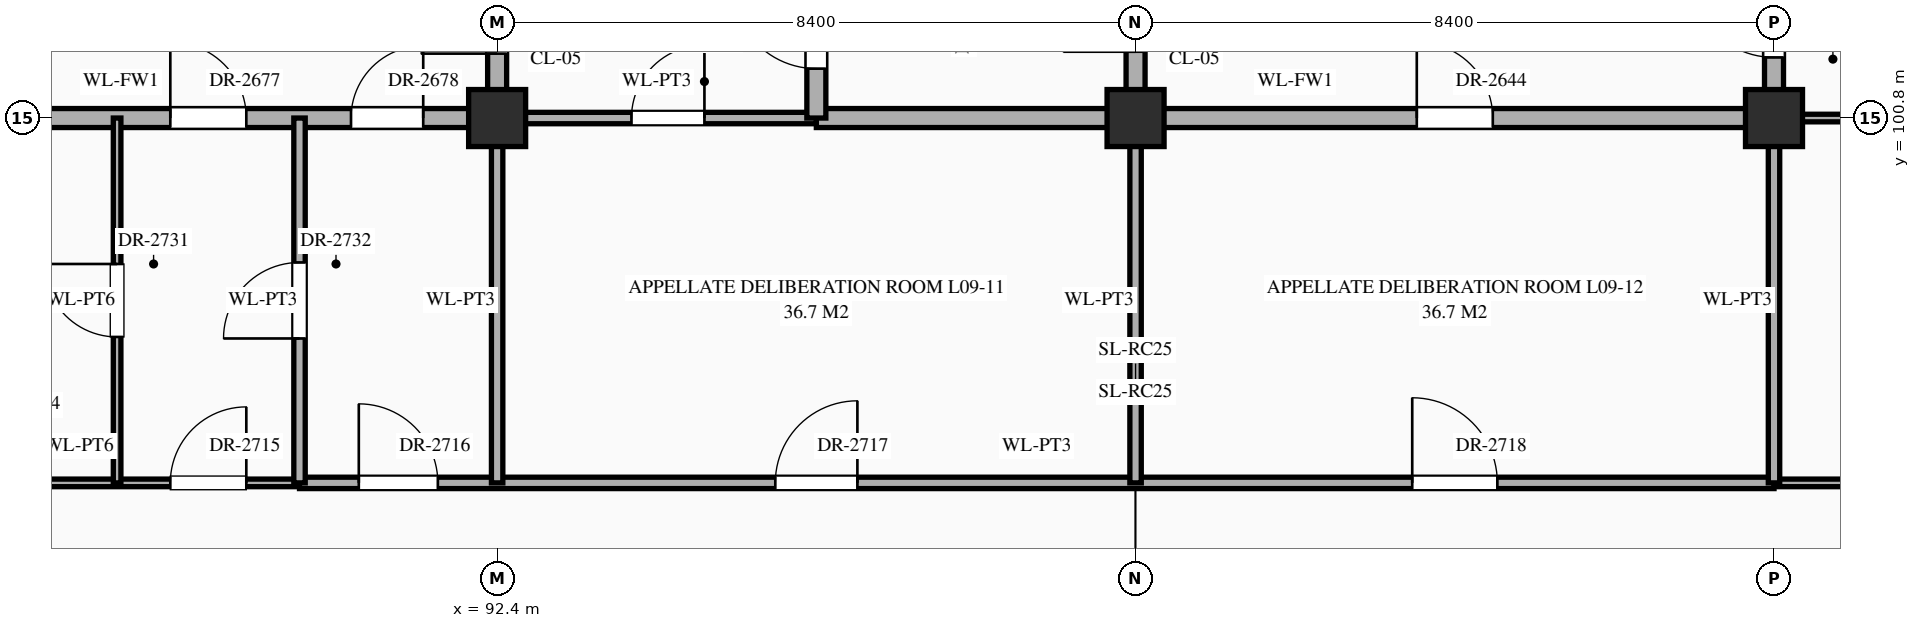
"""IFC4 building model, lengths in metres.
Left out: names, types, materials, properties, quantities, classifications, styles, units other than length and angle.
Written with IfcOpenShell. Run it as: python <this file> out.ifc"""

import sys

from ifc_helpers import new_model, si_unit, direction, frame, frame_2d, origin, origin_2d, place, context, subcontext, project, spatial, rectangle, extrude, element, fill, save


model = new_model("IFC4")
c1 = context("Model", 3, precision=1e-05, world=origin(), true_north=direction((0.0, 1.0)))
c2 = subcontext(c1, "Body", "Model", "MODEL_VIEW")
j1 = project(units=[si_unit("LENGTHUNIT", "METRE"), si_unit("PLANEANGLEUNIT", "RADIAN")], contexts=[c1])
p1 = place(None, origin())
s1 = spatial("IfcSite", under=j1, at=p1, CompositionType="ELEMENT")
p2 = place(p1, origin())
s2 = spatial("IfcBuilding", under=s1, at=p2, CompositionType="ELEMENT")
p3 = place(p2, frame((0.0, 0.0, 39.3)))
s3 = spatial("IfcBuildingStorey", under=s2, at=p3, CompositionType="ELEMENT", Elevation=39.3)
for number, where, z_axis, x_axis in (
    (1, (92.4, 100.8, 0.0), (0.0, 0.0, 1.0), (1.0, 0.0, 0.0)),
    (2, (100.8, 100.8, 0.0), (0.0, 0.0, 1.0), (1.0, 0.0, 0.0)),
    (3, (109.2, 100.8, 0.0), (0.0, 0.0, 1.0), (1.0, 0.0, 0.0)),
):
    element("IfcColumn", number, at=place(p3, frame(where, z_axis=z_axis, x_axis=x_axis)), inside=s3, PredefinedType="COLUMN", context=c2, shape_type="SweptSolid", body=[
        extrude(rectangle(XDim=0.75, YDim=0.75, at=origin_2d()), origin(), (0.0, 0.0, 1.0), 4.2),
    ])
p4 = place(p3, frame((84.0, 96.0, 0.0), z_axis=(0.0, 0.0, 1.0), x_axis=(1.0, 0.0, 0.0)))
e4 = element("IfcWall", 4, at=p4, inside=s3, PredefinedType="STANDARD", context=c2, shape_type="SweptSolid", body=[
    extrude(rectangle(XDim=5.8, YDim=0.1, at=frame_2d((2.9, 0.0))), origin(), (0.0, 0.0, 1.0), 3.95),
])
p5 = place(p4, frame((1.22, 0.0, 0.0)))
e5 = element("IfcOpeningElement", 5, at=p5, cuts=e4, PredefinedType="OPENING", context=c2, shape_type="SweptSolid", body=[
    extrude(rectangle(XDim=0.96, YDim=2.2, at=frame_2d((0.48, 1.1))), frame((0.0, 0.062, 0.0), z_axis=(0.0, -1.0, 0.0), x_axis=(1.0, 0.0, 0.0)), (0.0, 0.0, 1.0), 0.124),
])
p6 = place(p4, frame((4.1, 0.0, 0.0)))
e6 = element("IfcOpeningElement", 6, at=p6, cuts=e4, PredefinedType="OPENING", context=c2, shape_type="SweptSolid", body=[
    extrude(rectangle(XDim=1.0, YDim=2.25, at=frame_2d((0.5, 1.125))), frame((0.0, 0.062, 0.0), z_axis=(0.0, -1.0, 0.0), x_axis=(1.0, 0.0, 0.0)), (0.0, 0.0, 1.0), 0.124),
])
p7 = place(p3, frame((89.8, 96.0, 0.0), z_axis=(0.0, 0.0, 1.0), x_axis=(1.0, 0.0, 0.0)))
e7 = element("IfcWall", 7, at=p7, inside=s3, PredefinedType="STANDARD", context=c2, shape_type="SweptSolid", body=[
    extrude(rectangle(XDim=19.4, YDim=0.15, at=frame_2d((9.7, 0.0))), origin(), (0.0, 0.0, 1.0), 3.95),
])
p8 = place(p7, frame((0.78, 0.0, 0.0)))
e8 = element("IfcOpeningElement", 8, at=p8, cuts=e7, PredefinedType="OPENING", context=c2, shape_type="SweptSolid", body=[
    extrude(rectangle(XDim=1.04, YDim=2.2, at=frame_2d((0.52, 1.1))), frame((0.0, 0.087, 0.0), z_axis=(0.0, -1.0, 0.0), x_axis=(1.0, 0.0, 0.0)), (0.0, 0.0, 1.0), 0.174),
])
p9 = place(p7, frame((6.26, 0.0, 0.0)))
e9 = element("IfcOpeningElement", 9, at=p9, cuts=e7, PredefinedType="OPENING", context=c2, shape_type="SweptSolid", body=[
    extrude(rectangle(XDim=1.08, YDim=2.25, at=frame_2d((0.54, 1.125))), frame((0.0, 0.087, 0.0), z_axis=(0.0, -1.0, 0.0), x_axis=(1.0, 0.0, 0.0)), (0.0, 0.0, 1.0), 0.174),
])
p10 = place(p7, frame((14.64, 0.0, 0.0)))
e10 = element("IfcOpeningElement", 10, at=p10, cuts=e7, PredefinedType="OPENING", context=c2, shape_type="SweptSolid", body=[
    extrude(rectangle(XDim=1.12, YDim=2.25, at=frame_2d((0.56, 1.125))), frame((0.0, 0.087, 0.0), z_axis=(0.0, -1.0, 0.0), x_axis=(1.0, 0.0, 0.0)), (0.0, 0.0, 1.0), 0.174),
])
p11 = place(p3, frame((109.2, 96.0, 0.0), z_axis=(0.0, 0.0, 1.0), x_axis=(1.0, 0.0, 0.0)))
e11 = element("IfcWall", 11, at=p11, inside=s3, PredefinedType="STANDARD", context=c2, shape_type="SweptSolid", body=[
    extrude(rectangle(XDim=5.8, YDim=0.1, at=frame_2d((2.9, 0.0))), origin(), (0.0, 0.0, 1.0), 3.95),
])
p12 = place(p11, frame((1.12, 0.0, 0.0)))
e12 = element("IfcOpeningElement", 12, at=p12, cuts=e11, PredefinedType="OPENING", context=c2, shape_type="SweptSolid", body=[
    extrude(rectangle(XDim=1.16, YDim=2.3, at=frame_2d((0.58, 1.15))), frame((0.0, 0.062, 0.0), z_axis=(0.0, -1.0, 0.0), x_axis=(1.0, 0.0, 0.0)), (0.0, 0.0, 1.0), 0.124),
])
p13 = place(p11, frame((4.0, 0.0, 0.0)))
e13 = element("IfcOpeningElement", 13, at=p13, cuts=e11, PredefinedType="OPENING", context=c2, shape_type="SweptSolid", body=[
    extrude(rectangle(XDim=1.2, YDim=2.35, at=frame_2d((0.6, 1.175))), frame((0.0, 0.062, 0.0), z_axis=(0.0, -1.0, 0.0), x_axis=(1.0, 0.0, 0.0)), (0.0, 0.0, 1.0), 0.124),
])
p14 = place(p3, frame((75.6, 100.8, 0.0), z_axis=(0.0, 0.0, 1.0), x_axis=(1.0, 0.0, 0.0)))
e14 = element("IfcWall", 14, at=p14, inside=s3, PredefinedType="STANDARD", context=c2, shape_type="SweptSolid", body=[
    extrude(rectangle(XDim=16.8, YDim=0.25, at=frame_2d((8.4, 0.0))), origin(), (0.0, 0.0, 1.0), 3.1),
])
p15 = place(p14, frame((3.7, 0.0, 0.0)))
e15 = element("IfcOpeningElement", 15, at=p15, cuts=e14, PredefinedType="OPENING", context=c2, shape_type="SweptSolid", body=[
    extrude(rectangle(XDim=1.0, YDim=2.2, at=frame_2d((0.5, 1.1))), frame((0.0, 0.137, 0.0), z_axis=(0.0, -1.0, 0.0), x_axis=(1.0, 0.0, 0.0)), (0.0, 0.0, 1.0), 0.274),
])
p16 = place(p14, frame((9.698, 0.0, 0.0)))
e16 = element("IfcOpeningElement", 16, at=p16, cuts=e14, PredefinedType="OPENING", context=c2, shape_type="SweptSolid", body=[
    extrude(rectangle(XDim=1.1, YDim=2.2, at=frame_2d((0.55, 1.1))), frame((0.0, 0.137, 0.0), z_axis=(0.0, -1.0, 0.0), x_axis=(1.0, 0.0, 0.0)), (0.0, 0.0, 1.0), 0.274),
])
p17 = place(p14, frame((12.5, 0.0, 0.0)))
e17 = element("IfcOpeningElement", 17, at=p17, cuts=e14, PredefinedType="OPENING", context=c2, shape_type="SweptSolid", body=[
    extrude(rectangle(XDim=1.0, YDim=2.2, at=frame_2d((0.5, 1.1))), frame((0.0, 0.137, 0.0), z_axis=(0.0, -1.0, 0.0), x_axis=(1.0, 0.0, 0.0)), (0.0, 0.0, 1.0), 0.274),
])
p18 = place(p14, frame((14.877, 0.0, 0.0)))
e18 = element("IfcOpeningElement", 18, at=p18, cuts=e14, PredefinedType="OPENING", context=c2, shape_type="SweptSolid", body=[
    extrude(rectangle(XDim=0.95, YDim=2.15, at=frame_2d((0.475, 1.075))), frame((0.0, 0.137, 0.0), z_axis=(0.0, -1.0, 0.0), x_axis=(1.0, 0.0, 0.0)), (0.0, 0.0, 1.0), 0.274),
])
p19 = place(p3, frame((92.4, 100.8, 0.0), z_axis=(0.0, 0.0, 1.0), x_axis=(1.0, 0.0, 0.0)))
e19 = element("IfcWall", 19, at=p19, inside=s3, PredefinedType="STANDARD", context=c2, shape_type="SweptSolid", body=[
    extrude(rectangle(XDim=4.2, YDim=0.15, at=frame_2d((2.1, 0.0))), origin(), (0.0, 0.0, 1.0), 3.1),
])
p20 = place(p19, frame((1.768, 0.0, 0.0)))
e20 = element("IfcOpeningElement", 20, at=p20, cuts=e19, PredefinedType="OPENING", context=c2, shape_type="SweptSolid", body=[
    extrude(rectangle(XDim=0.96, YDim=2.2, at=frame_2d((0.48, 1.1))), frame((0.0, 0.087, 0.0), z_axis=(0.0, -1.0, 0.0), x_axis=(1.0, 0.0, 0.0)), (0.0, 0.0, 1.0), 0.174),
])
p21 = place(p3, frame((96.6, 100.8, 0.0), z_axis=(0.0, 0.0, 1.0), x_axis=(1.0, 0.0, 0.0)))
e21 = element("IfcWall", 21, at=p21, inside=s3, PredefinedType="STANDARD", context=c2, shape_type="SweptSolid", body=[
    extrude(rectangle(XDim=12.6, YDim=0.25, at=frame_2d((6.3, 0.0))), origin(), (0.0, 0.0, 1.0), 3.1),
])
p22 = place(p21, frame((7.9, 0.0, 0.0)))
e22 = element("IfcOpeningElement", 22, at=p22, cuts=e21, PredefinedType="OPENING", context=c2, shape_type="SweptSolid", body=[
    extrude(rectangle(XDim=1.0, YDim=2.2, at=frame_2d((0.5, 1.1))), frame((0.0, 0.137, 0.0), z_axis=(0.0, -1.0, 0.0), x_axis=(1.0, 0.0, 0.0)), (0.0, 0.0, 1.0), 0.274),
])
p23 = place(p3, frame((109.2, 100.8, 0.0), z_axis=(0.0, 0.0, 1.0), x_axis=(1.0, 0.0, 0.0)))
e23 = element("IfcWall", 23, at=p23, inside=s3, PredefinedType="STANDARD", context=c2, shape_type="SweptSolid", body=[
    extrude(rectangle(XDim=3.4, YDim=0.1, at=frame_2d((1.7, 0.0))), origin(), (0.0, 0.0, 1.0), 3.1),
])
p24 = place(p23, frame((1.317, 0.0, 0.0)))
e24 = element("IfcOpeningElement", 24, at=p24, cuts=e23, PredefinedType="OPENING", context=c2, shape_type="SweptSolid", body=[
    extrude(rectangle(XDim=1.06, YDim=2.4, at=frame_2d((0.53, 1.2))), frame((0.0, 0.062, 0.0), z_axis=(0.0, -1.0, 0.0), x_axis=(1.0, 0.0, 0.0)), (0.0, 0.0, 1.0), 0.124),
])
p25 = place(p3, frame((87.4, 96.0, 0.0), z_axis=(0.0, 0.0, 1.0), x_axis=(0.0, 1.0, 0.0)))
e25 = element("IfcWall", 25, at=p25, inside=s3, PredefinedType="STANDARD", context=c2, shape_type="SweptSolid", body=[
    extrude(rectangle(XDim=4.8, YDim=0.1, at=frame_2d((2.4, 0.0))), origin(), (0.0, 0.0, 1.0), 3.95),
])
p26 = place(p25, frame((1.92, 0.0, 0.0)))
e26 = element("IfcOpeningElement", 26, at=p26, cuts=e25, PredefinedType="OPENING", context=c2, shape_type="SweptSolid", body=[
    extrude(rectangle(XDim=0.96, YDim=2.2, at=frame_2d((0.48, 1.1))), frame((0.0, 0.062, 0.0), z_axis=(0.0, -1.0, 0.0), x_axis=(1.0, 0.0, 0.0)), (0.0, 0.0, 1.0), 0.124),
])
p27 = place(p3, frame((89.8, 96.0, 0.0), z_axis=(0.0, 0.0, 1.0), x_axis=(0.0, 1.0, 0.0)))
e27 = element("IfcWall", 27, at=p27, inside=s3, PredefinedType="STANDARD", context=c2, shape_type="SweptSolid", body=[
    extrude(rectangle(XDim=4.8, YDim=0.15, at=frame_2d((2.4, 0.0))), origin(), (0.0, 0.0, 1.0), 3.95),
])
p28 = place(p27, frame((1.9, 0.0, 0.0)))
e28 = element("IfcOpeningElement", 28, at=p28, cuts=e27, PredefinedType="OPENING", context=c2, shape_type="SweptSolid", body=[
    extrude(rectangle(XDim=1.0, YDim=2.25, at=frame_2d((0.5, 1.125))), frame((0.0, 0.087, 0.0), z_axis=(0.0, -1.0, 0.0), x_axis=(1.0, 0.0, 0.0)), (0.0, 0.0, 1.0), 0.174),
])
p29 = place(p3, frame((92.4, 96.0, 0.0), z_axis=(0.0, 0.0, 1.0), x_axis=(0.0, 1.0, 0.0)))
e29 = element("IfcWall", 29, at=p29, inside=s3, PredefinedType="STANDARD", context=c2, shape_type="SweptSolid", body=[
    extrude(rectangle(XDim=4.8, YDim=0.15, at=frame_2d((2.4, 0.0))), origin(), (0.0, 0.0, 1.0), 3.2),
])
p30 = place(p3, frame((92.4, 100.8, 0.0), z_axis=(0.0, 0.0, 1.0), x_axis=(0.0, 1.0, 0.0)))
e30 = element("IfcWall", 30, at=p30, inside=s3, PredefinedType="STANDARD", context=c2, shape_type="SweptSolid", body=[
    extrude(rectangle(XDim=3.6, YDim=0.25, at=frame_2d((1.8, 0.0))), origin(), (0.0, 0.0, 1.0), 3.2),
])
p31 = place(p30, frame((0.847, 0.0, 0.0)))
e31 = element("IfcOpeningElement", 31, at=p31, cuts=e30, PredefinedType="OPENING", context=c2, shape_type="SweptSolid", body=[
    extrude(rectangle(XDim=1.0, YDim=2.2, at=frame_2d((0.5, 1.1))), frame((0.0, 0.137, 0.0), z_axis=(0.0, -1.0, 0.0), x_axis=(1.0, 0.0, 0.0)), (0.0, 0.0, 1.0), 0.274),
])
p32 = place(p3, frame((96.6, 100.8, 0.0), z_axis=(0.0, 0.0, 1.0), x_axis=(0.0, 1.0, 0.0)))
e32 = element("IfcWall", 32, at=p32, inside=s3, PredefinedType="STANDARD", context=c2, shape_type="SweptSolid", body=[
    extrude(rectangle(XDim=3.6, YDim=0.25, at=frame_2d((1.8, 0.0))), origin(), (0.0, 0.0, 1.0), 3.95),
])
p33 = place(p32, frame((0.65, 0.0, 0.0)))
e33 = element("IfcOpeningElement", 33, at=p33, cuts=e32, PredefinedType="OPENING", context=c2, shape_type="SweptSolid", body=[
    extrude(rectangle(XDim=1.1, YDim=2.2, at=frame_2d((0.55, 1.1))), frame((0.0, 0.137, 0.0), z_axis=(0.0, -1.0, 0.0), x_axis=(1.0, 0.0, 0.0)), (0.0, 0.0, 1.0), 0.274),
])
p34 = place(p3, frame((100.8, 96.0, 0.0), z_axis=(0.0, 0.0, 1.0), x_axis=(0.0, 1.0, 0.0)))
e34 = element("IfcWall", 34, at=p34, inside=s3, PredefinedType="STANDARD", context=c2, shape_type="SweptSolid", body=[
    extrude(rectangle(XDim=4.8, YDim=0.15, at=frame_2d((2.4, 0.0))), origin(), (0.0, 0.0, 1.0), 3.2),
])
p35 = place(p3, frame((100.8, 100.8, 0.0), z_axis=(0.0, 0.0, 1.0), x_axis=(0.0, 1.0, 0.0)))
e35 = element("IfcWall", 35, at=p35, inside=s3, PredefinedType="STANDARD", context=c2, shape_type="SweptSolid", body=[
    extrude(rectangle(XDim=2.4, YDim=0.25, at=frame_2d((1.2, 0.0))), origin(), (0.0, 0.0, 1.0), 3.2),
])
p36 = place(p35, frame((0.873, 0.0, 0.0)))
e36 = element("IfcOpeningElement", 36, at=p36, cuts=e35, PredefinedType="OPENING", context=c2, shape_type="SweptSolid", body=[
    extrude(rectangle(XDim=0.95, YDim=2.15, at=frame_2d((0.475, 1.075))), frame((0.0, 0.137, 0.0), z_axis=(0.0, -1.0, 0.0), x_axis=(1.0, 0.0, 0.0)), (0.0, 0.0, 1.0), 0.274),
])
p37 = place(p3, frame((109.2, 96.0, 0.0), z_axis=(0.0, 0.0, 1.0), x_axis=(0.0, 1.0, 0.0)))
e37 = element("IfcWall", 37, at=p37, inside=s3, PredefinedType="STANDARD", context=c2, shape_type="SweptSolid", body=[
    extrude(rectangle(XDim=4.8, YDim=0.15, at=frame_2d((2.4, 0.0))), origin(), (0.0, 0.0, 1.0), 3.2),
])
p38 = place(p3, frame((109.2, 100.8, 0.0), z_axis=(0.0, 0.0, 1.0), x_axis=(0.0, 1.0, 0.0)))
e38 = element("IfcWall", 38, at=p38, inside=s3, PredefinedType="STANDARD", context=c2, shape_type="SweptSolid", body=[
    extrude(rectangle(XDim=2.4, YDim=0.25, at=frame_2d((1.2, 0.0))), origin(), (0.0, 0.0, 1.0), 3.2),
])
p39 = place(p38, frame((0.798, 0.0, 0.0)))
e39 = element("IfcOpeningElement", 39, at=p39, cuts=e38, PredefinedType="OPENING", context=c2, shape_type="SweptSolid", body=[
    extrude(rectangle(XDim=1.1, YDim=2.2, at=frame_2d((0.55, 1.1))), frame((0.0, 0.137, 0.0), z_axis=(0.0, -1.0, 0.0), x_axis=(1.0, 0.0, 0.0)), (0.0, 0.0, 1.0), 0.274),
])
p40 = place(p39, origin())
e40 = element("IfcDoor", 40, at=p40, inside=s3, OperationType="SINGLE_SWING_RIGHT", PredefinedType="DOOR", context=c2, shape_type="SweptSolid", body=[
    extrude(rectangle(XDim=1.1, YDim=2.2, at=frame_2d((0.55, 1.1))), frame((0.0, 0.025, 0.0), z_axis=(0.0, -1.0, 0.0), x_axis=(1.0, 0.0, 0.0)), (0.0, 0.0, 1.0), 0.05),
])
fill(e39, e40)
p41 = place(p22, origin())
e41 = element("IfcDoor", 41, at=p41, inside=s3, OperationType="SINGLE_SWING_LEFT", PredefinedType="DOOR", context=c2, shape_type="SweptSolid", body=[
    extrude(rectangle(XDim=1.0, YDim=2.2, at=frame_2d((0.5, 1.1))), frame((0.0, 0.025, 0.0), z_axis=(0.0, -1.0, 0.0), x_axis=(1.0, 0.0, 0.0)), (0.0, 0.0, 1.0), 0.05),
])
fill(e22, e41)
p42 = place(p33, origin())
e42 = element("IfcDoor", 42, at=p42, inside=s3, OperationType="SINGLE_SWING_RIGHT", PredefinedType="DOOR", context=c2, shape_type="SweptSolid", body=[
    extrude(rectangle(XDim=1.1, YDim=2.2, at=frame_2d((0.55, 1.1))), frame((0.0, 0.025, 0.0), z_axis=(0.0, -1.0, 0.0), x_axis=(1.0, 0.0, 0.0)), (0.0, 0.0, 1.0), 0.05),
])
fill(e33, e42)
p43 = place(p31, origin())
e43 = element("IfcDoor", 43, at=p43, inside=s3, OperationType="SINGLE_SWING_LEFT", PredefinedType="DOOR", context=c2, shape_type="SweptSolid", body=[
    extrude(rectangle(XDim=1.0, YDim=2.2, at=frame_2d((0.5, 1.1))), frame((0.0, 0.025, 0.0), z_axis=(0.0, -1.0, 0.0), x_axis=(1.0, 0.0, 0.0)), (0.0, 0.0, 1.0), 0.05),
])
fill(e31, e43)
p44 = place(p20, origin())
e44 = element("IfcDoor", 44, at=p44, inside=s3, OperationType="SINGLE_SWING_RIGHT", PredefinedType="DOOR", context=c2, shape_type="SweptSolid", body=[
    extrude(rectangle(XDim=0.96, YDim=2.2, at=frame_2d((0.48, 1.1))), frame((0.0, 0.025, 0.0), z_axis=(0.0, -1.0, 0.0), x_axis=(1.0, 0.0, 0.0)), (0.0, 0.0, 1.0), 0.05),
])
fill(e20, e44)
p45 = place(p17, origin())
e45 = element("IfcDoor", 45, at=p45, inside=s3, OperationType="SINGLE_SWING_LEFT", PredefinedType="DOOR", context=c2, shape_type="SweptSolid", body=[
    extrude(rectangle(XDim=1.0, YDim=2.2, at=frame_2d((0.5, 1.1))), frame((0.0, 0.025, 0.0), z_axis=(0.0, -1.0, 0.0), x_axis=(1.0, 0.0, 0.0)), (0.0, 0.0, 1.0), 0.05),
])
fill(e17, e45)
p46 = place(p18, origin())
e46 = element("IfcDoor", 46, at=p46, inside=s3, OperationType="SINGLE_SWING_RIGHT", PredefinedType="DOOR", context=c2, shape_type="SweptSolid", body=[
    extrude(rectangle(XDim=0.95, YDim=2.15, at=frame_2d((0.475, 1.075))), frame((0.0, 0.025, 0.0), z_axis=(0.0, -1.0, 0.0), x_axis=(1.0, 0.0, 0.0)), (0.0, 0.0, 1.0), 0.05),
])
fill(e18, e46)
p47 = place(p6, origin())
e47 = element("IfcDoor", 47, at=p47, inside=s3, OperationType="SINGLE_SWING_RIGHT", PredefinedType="DOOR", context=c2, shape_type="SweptSolid", body=[
    extrude(rectangle(XDim=1.0, YDim=2.25, at=frame_2d((0.5, 1.125))), frame((0.0, 0.025, 0.0), z_axis=(0.0, -1.0, 0.0), x_axis=(1.0, 0.0, 0.0)), (0.0, 0.0, 1.0), 0.05),
])
fill(e6, e47)
p48 = place(p8, origin())
e48 = element("IfcDoor", 48, at=p48, inside=s3, OperationType="SINGLE_SWING_LEFT", PredefinedType="DOOR", context=c2, shape_type="SweptSolid", body=[
    extrude(rectangle(XDim=1.04, YDim=2.2, at=frame_2d((0.52, 1.1))), frame((0.0, 0.025, 0.0), z_axis=(0.0, -1.0, 0.0), x_axis=(1.0, 0.0, 0.0)), (0.0, 0.0, 1.0), 0.05),
])
fill(e8, e48)
p49 = place(p9, origin())
e49 = element("IfcDoor", 49, at=p49, inside=s3, OperationType="SINGLE_SWING_RIGHT", PredefinedType="DOOR", context=c2, shape_type="SweptSolid", body=[
    extrude(rectangle(XDim=1.08, YDim=2.25, at=frame_2d((0.54, 1.125))), frame((0.0, 0.025, 0.0), z_axis=(0.0, -1.0, 0.0), x_axis=(1.0, 0.0, 0.0)), (0.0, 0.0, 1.0), 0.05),
])
fill(e9, e49)
p50 = place(p10, origin())
e50 = element("IfcDoor", 50, at=p50, inside=s3, OperationType="SINGLE_SWING_LEFT", PredefinedType="DOOR", context=c2, shape_type="SweptSolid", body=[
    extrude(rectangle(XDim=1.12, YDim=2.25, at=frame_2d((0.56, 1.125))), frame((0.0, 0.025, 0.0), z_axis=(0.0, -1.0, 0.0), x_axis=(1.0, 0.0, 0.0)), (0.0, 0.0, 1.0), 0.05),
])
fill(e10, e50)
p51 = place(p26, origin())
e51 = element("IfcDoor", 51, at=p51, inside=s3, OperationType="SINGLE_SWING_RIGHT", PredefinedType="DOOR", context=c2, shape_type="SweptSolid", body=[
    extrude(rectangle(XDim=0.96, YDim=2.2, at=frame_2d((0.48, 1.1))), frame((0.0, 0.025, 0.0), z_axis=(0.0, -1.0, 0.0), x_axis=(1.0, 0.0, 0.0)), (0.0, 0.0, 1.0), 0.05),
])
fill(e26, e51)
p52 = place(p28, origin())
e52 = element("IfcDoor", 52, at=p52, inside=s3, OperationType="SINGLE_SWING_LEFT", PredefinedType="DOOR", context=c2, shape_type="SweptSolid", body=[
    extrude(rectangle(XDim=1.0, YDim=2.25, at=frame_2d((0.5, 1.125))), frame((0.0, 0.025, 0.0), z_axis=(0.0, -1.0, 0.0), x_axis=(1.0, 0.0, 0.0)), (0.0, 0.0, 1.0), 0.05),
])
fill(e28, e52)
save(model, sys.argv[1])
